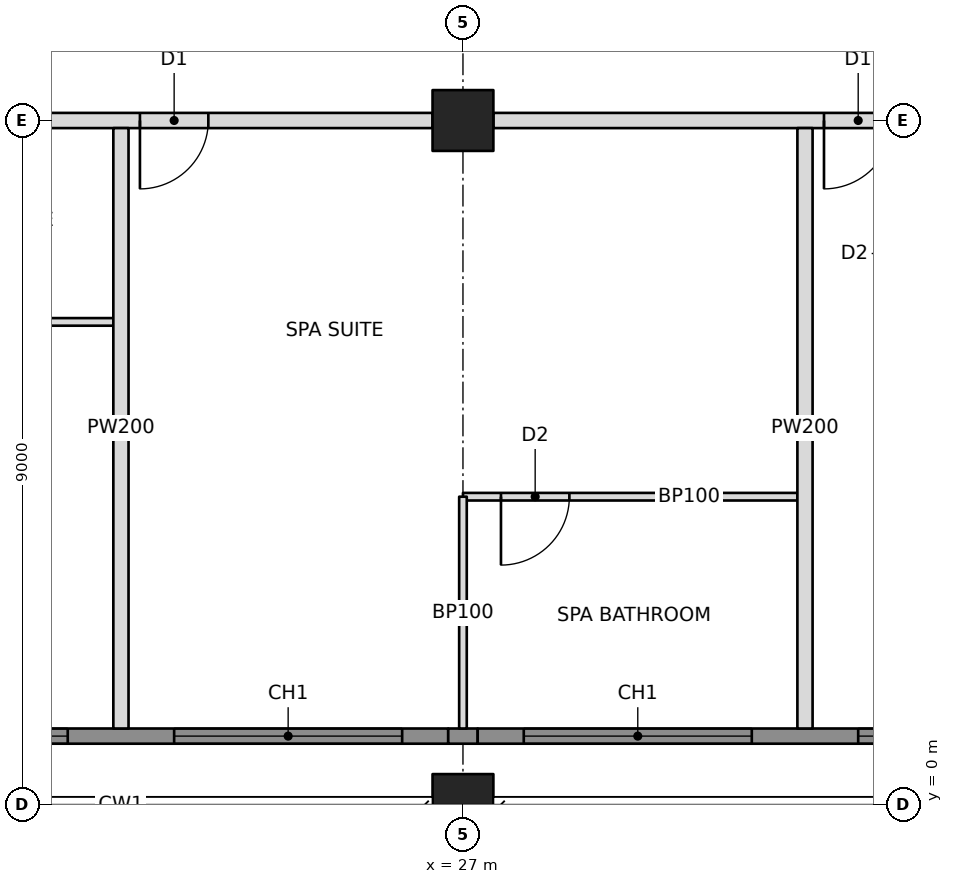
"""IFC4 building model, lengths in metres.
Left out: names, types, materials, properties, quantities, classifications, styles, units other than length and angle.
Written with IfcOpenShell. Run it as: python <this file> out.ifc"""

import sys

from ifc_helpers import new_model, si_unit, direction, frame, frame_2d, origin, origin_2d, place, context, subcontext, project, spatial, rectangle, hollow_rectangle, extrude, element, fill, save


model = new_model("IFC4")
c1 = context("Model", 3, precision=1e-05, world=origin(), true_north=direction((0.0, 1.0)))
c2 = subcontext(c1, "Body", "Model", "MODEL_VIEW")
j1 = project(units=[si_unit("LENGTHUNIT", "METRE"), si_unit("PLANEANGLEUNIT", "RADIAN")], contexts=[c1])
p1 = place(None, origin())
s1 = spatial("IfcSite", under=j1, at=p1, CompositionType="ELEMENT")
p2 = place(p1, origin())
s2 = spatial("IfcBuilding", under=s1, at=p2, CompositionType="ELEMENT")
p3 = place(p2, frame((0.0, 0.0, 208.0)))
s3 = spatial("IfcBuildingStorey", under=s2, at=p3, CompositionType="ELEMENT", Elevation=208.0)
p4 = place(p3, frame((27.0, 0.0, 0.0), z_axis=(0.0, 0.0, 1.0), x_axis=(1.0, 0.0, 0.0)))
e1 = element("IfcColumn", 1, at=p4, inside=s3, PredefinedType="COLUMN", context=c2, shape_type="SweptSolid", body=[
    extrude(hollow_rectangle(XDim=0.8, YDim=0.8, WallThickness=0.06, at=origin_2d()), origin(), (0.0, 0.0, 1.0), 3.4),
])
p5 = place(p3, frame((27.0, 9.0, 0.0), z_axis=(0.0, 0.0, 1.0), x_axis=(1.0, 0.0, 0.0)))
e2 = element("IfcColumn", 2, at=p5, inside=s3, PredefinedType="COLUMN", context=c2, shape_type="SweptSolid", body=[
    extrude(hollow_rectangle(XDim=0.8, YDim=0.8, WallThickness=0.05, at=origin_2d()), origin(), (0.0, 0.0, 1.0), 3.4),
])
p6 = place(p3, frame((18.4, 9.0, 0.0), z_axis=(0.0, 0.0, 1.0), x_axis=(1.0, 0.0, 0.0)))
e3 = element("IfcWall", 3, at=p6, inside=s3, PredefinedType="PARTITIONING", context=c2, shape_type="SweptSolid", body=[
    extrude(rectangle(XDim=8.2, YDim=0.2, at=frame_2d((4.1, 0.0))), origin(), (0.0, 0.0, 1.0), 2.405),
])
p7 = place(p6, frame((4.35, 0.0, 0.0)))
e4 = element("IfcOpeningElement", 4, at=p7, cuts=e3, PredefinedType="OPENING", context=c2, shape_type="SweptSolid", body=[
    extrude(rectangle(XDim=0.9, YDim=2.1, at=frame_2d((0.45, 1.05))), frame((0.0, 0.11, 0.0), z_axis=(0.0, -1.0, 0.0), x_axis=(1.0, 0.0, 0.0)), (0.0, 0.0, 1.0), 0.22),
])
p8 = place(p3, frame((27.4, 9.0, 0.0), z_axis=(0.0, 0.0, 1.0), x_axis=(1.0, 0.0, 0.0)))
e5 = element("IfcWall", 5, at=p8, inside=s3, PredefinedType="PARTITIONING", context=c2, shape_type="SweptSolid", body=[
    extrude(rectangle(XDim=8.2, YDim=0.2, at=frame_2d((4.1, 0.0))), origin(), (0.0, 0.0, 1.0), 2.405),
])
p9 = place(p8, frame((4.35, 0.0, 0.0)))
e6 = element("IfcOpeningElement", 6, at=p9, cuts=e5, PredefinedType="OPENING", context=c2, shape_type="SweptSolid", body=[
    extrude(rectangle(XDim=0.9, YDim=2.1, at=frame_2d((0.45, 1.05))), frame((0.0, 0.11, 0.0), z_axis=(0.0, -1.0, 0.0), x_axis=(1.0, 0.0, 0.0)), (0.0, 0.0, 1.0), 0.22),
])
for number, where, z_axis, x_axis in (
    (7, (22.5, 8.9, 0.0), (0.0, 0.0, 1.0), (0.0, -1.0, 0.0)),
    (8, (31.5, 8.9, 0.0), (0.0, 0.0, 1.0), (0.0, -1.0, 0.0)),
):
    element("IfcWall", number, at=place(p3, frame(where, z_axis=z_axis, x_axis=x_axis)), inside=s3, PredefinedType="PARTITIONING", context=c2, shape_type="SweptSolid", body=[
        extrude(rectangle(XDim=7.9, YDim=0.2, at=frame_2d((3.95, 0.0))), origin(), (0.0, 0.0, 1.0), 2.404),
    ])
p10 = place(p3, frame((18.95, 6.35, 0.0), z_axis=(0.0, 0.0, 1.0), x_axis=(1.0, 0.0, 0.0)))
e9 = element("IfcWall", 9, at=p10, inside=s3, PredefinedType="PARTITIONING", context=c2, shape_type="SweptSolid", body=[
    extrude(rectangle(XDim=3.45, YDim=0.1, at=frame_2d((1.725, 0.0))), origin(), (0.0, 0.0, 1.0), 3.2),
])
p11 = place(p3, frame((27.0, 4.05, 0.0), z_axis=(0.0, 0.0, 1.0), x_axis=(1.0, 0.0, 0.0)))
e10 = element("IfcWall", 10, at=p11, inside=s3, PredefinedType="PARTITIONING", context=c2, shape_type="SweptSolid", body=[
    extrude(rectangle(XDim=4.4, YDim=0.1, at=frame_2d((2.2, 0.0))), origin(), (0.0, 0.0, 1.0), 2.404),
])
p12 = place(p11, frame((0.5, 0.0, 0.0)))
e11 = element("IfcOpeningElement", 11, at=p12, cuts=e10, PredefinedType="OPENING", context=c2, shape_type="SweptSolid", body=[
    extrude(rectangle(XDim=0.9, YDim=2.1, at=frame_2d((0.45, 1.05))), frame((0.0, 0.06, 0.0), z_axis=(0.0, -1.0, 0.0), x_axis=(1.0, 0.0, 0.0)), (0.0, 0.0, 1.0), 0.12),
])
p13 = place(p3, frame((27.0, 4.05, 0.0), z_axis=(0.0, 0.0, 1.0), x_axis=(0.0, -1.0, 0.0)))
e12 = element("IfcWall", 12, at=p13, inside=s3, PredefinedType="PARTITIONING", context=c2, shape_type="SweptSolid", body=[
    extrude(rectangle(XDim=3.05, YDim=0.1, at=frame_2d((1.525, 0.0))), origin(), (0.0, 0.0, 1.0), 2.405),
])
p14 = place(p3, frame((18.194, 0.9, 0.0), z_axis=(0.0, 0.0, 1.0), x_axis=(1.0, 0.0, 0.0)))
e13 = element("IfcWall", 13, at=p14, inside=s3, PredefinedType="SOLIDWALL", context=c2, shape_type="SweptSolid", body=[
    extrude(rectangle(XDim=8.612, YDim=0.2, at=frame_2d((4.306, 0.0))), origin(), (0.0, 0.0, 1.0), 3.2),
])
p15 = place(p14, frame((0.606, 0.0, 0.6)))
e14 = element("IfcOpeningElement", 14, at=p15, cuts=e13, PredefinedType="OPENING", context=c2, shape_type="SweptSolid", body=[
    extrude(rectangle(XDim=3.0, YDim=2.2, at=frame_2d((1.5, 1.1))), frame((0.0, 0.11, 0.0), z_axis=(0.0, -1.0, 0.0), x_axis=(1.0, 0.0, 0.0)), (0.0, 0.0, 1.0), 0.22),
])
p16 = place(p14, frame((5.006, 0.0, 0.6)))
e15 = element("IfcOpeningElement", 15, at=p16, cuts=e13, PredefinedType="OPENING", context=c2, shape_type="SweptSolid", body=[
    extrude(rectangle(XDim=3.0, YDim=2.2, at=frame_2d((1.5, 1.1))), frame((0.0, 0.11, 0.0), z_axis=(0.0, -1.0, 0.0), x_axis=(1.0, 0.0, 0.0)), (0.0, 0.0, 1.0), 0.22),
])
p17 = place(p3, frame((26.806, 0.9, 0.0), z_axis=(0.0, 0.0, 1.0), x_axis=(1.0, 0.0, 0.0)))
e16 = element("IfcWall", 16, at=p17, inside=s3, PredefinedType="SOLIDWALL", context=c2, shape_type="SweptSolid", body=[
    extrude(rectangle(XDim=0.388, YDim=0.2, at=frame_2d((0.194, 0.0))), origin(), (0.0, 0.0, 1.0), 2.404),
])
p18 = place(p3, frame((27.194, 0.9, 0.0), z_axis=(0.0, 0.0, 1.0), x_axis=(1.0, 0.0, 0.0)))
e17 = element("IfcWall", 17, at=p18, inside=s3, PredefinedType="SOLIDWALL", context=c2, shape_type="SweptSolid", body=[
    extrude(rectangle(XDim=8.671, YDim=0.2, at=frame_2d((4.335, 0.0))), origin(), (0.0, 0.0, 1.0), 3.2),
])
p19 = place(p18, frame((0.606, 0.0, 0.6)))
e18 = element("IfcOpeningElement", 18, at=p19, cuts=e17, PredefinedType="OPENING", context=c2, shape_type="SweptSolid", body=[
    extrude(rectangle(XDim=3.0, YDim=2.2, at=frame_2d((1.5, 1.1))), frame((0.0, 0.11, 0.0), z_axis=(0.0, -1.0, 0.0), x_axis=(1.0, 0.0, 0.0)), (0.0, 0.0, 1.0), 0.22),
])
p20 = place(p18, frame((5.006, 0.0, 0.6)))
e19 = element("IfcOpeningElement", 19, at=p20, cuts=e17, PredefinedType="OPENING", context=c2, shape_type="SweptSolid", body=[
    extrude(rectangle(XDim=3.0, YDim=2.2, at=frame_2d((1.5, 1.1))), frame((0.0, 0.11, 0.0), z_axis=(0.0, -1.0, 0.0), x_axis=(1.0, 0.0, 0.0)), (0.0, 0.0, 1.0), 0.22),
])
p21 = place(p15, origin())
e20 = element("IfcWindow", 20, at=p21, inside=s3, PartitioningType="TRIPLE_PANEL_VERTICAL", PredefinedType="WINDOW", context=c2, shape_type="SweptSolid", body=[
    extrude(rectangle(XDim=3.0, YDim=2.2, at=frame_2d((1.5, 1.1))), frame((0.0, 0.03, 0.0), z_axis=(0.0, -1.0, 0.0), x_axis=(1.0, 0.0, 0.0)), (0.0, 0.0, 1.0), 0.06),
])
fill(e14, e20)
p22 = place(p16, origin())
e21 = element("IfcWindow", 21, at=p22, inside=s3, PartitioningType="TRIPLE_PANEL_VERTICAL", PredefinedType="WINDOW", context=c2, shape_type="SweptSolid", body=[
    extrude(rectangle(XDim=3.0, YDim=2.2, at=frame_2d((1.5, 1.1))), frame((0.0, 0.03, 0.0), z_axis=(0.0, -1.0, 0.0), x_axis=(1.0, 0.0, 0.0)), (0.0, 0.0, 1.0), 0.06),
])
fill(e15, e21)
p23 = place(p19, origin())
e22 = element("IfcWindow", 22, at=p23, inside=s3, PartitioningType="TRIPLE_PANEL_VERTICAL", PredefinedType="WINDOW", context=c2, shape_type="SweptSolid", body=[
    extrude(rectangle(XDim=3.0, YDim=2.2, at=frame_2d((1.5, 1.1))), frame((0.0, 0.03, 0.0), z_axis=(0.0, -1.0, 0.0), x_axis=(1.0, 0.0, 0.0)), (0.0, 0.0, 1.0), 0.06),
])
fill(e18, e22)
p24 = place(p20, origin())
e23 = element("IfcWindow", 23, at=p24, inside=s3, PartitioningType="TRIPLE_PANEL_VERTICAL", PredefinedType="WINDOW", context=c2, shape_type="SweptSolid", body=[
    extrude(rectangle(XDim=3.0, YDim=2.2, at=frame_2d((1.5, 1.1))), frame((0.0, 0.03, 0.0), z_axis=(0.0, -1.0, 0.0), x_axis=(1.0, 0.0, 0.0)), (0.0, 0.0, 1.0), 0.06),
])
fill(e19, e23)
p25 = place(p12, frame((0.9, 0.0, 0.0), z_axis=(0.0, 0.0, 1.0), x_axis=(-1.0, 0.0, 0.0)))
e24 = element("IfcDoor", 24, at=p25, inside=s3, OperationType="SINGLE_SWING_RIGHT", PredefinedType="DOOR", context=c2, shape_type="SweptSolid", body=[
    extrude(rectangle(XDim=0.9, YDim=2.1, at=frame_2d((0.45, 1.05))), frame((0.0, 0.025, 0.0), z_axis=(0.0, -1.0, 0.0), x_axis=(1.0, 0.0, 0.0)), (0.0, 0.0, 1.0), 0.05),
])
fill(e11, e24)
p26 = place(p7, frame((0.9, 0.0, 0.0), z_axis=(0.0, 0.0, 1.0), x_axis=(-1.0, 0.0, 0.0)))
e25 = element("IfcDoor", 25, at=p26, inside=s3, OperationType="SINGLE_SWING_RIGHT", PredefinedType="DOOR", context=c2, shape_type="SweptSolid", body=[
    extrude(rectangle(XDim=0.9, YDim=2.1, at=frame_2d((0.45, 1.05))), frame((0.0, 0.025, 0.0), z_axis=(0.0, -1.0, 0.0), x_axis=(1.0, 0.0, 0.0)), (0.0, 0.0, 1.0), 0.05),
])
fill(e4, e25)
p27 = place(p9, frame((0.9, 0.0, 0.0), z_axis=(0.0, 0.0, 1.0), x_axis=(-1.0, 0.0, 0.0)))
e26 = element("IfcDoor", 26, at=p27, inside=s3, OperationType="SINGLE_SWING_RIGHT", PredefinedType="DOOR", context=c2, shape_type="SweptSolid", body=[
    extrude(rectangle(XDim=0.9, YDim=2.1, at=frame_2d((0.45, 1.05))), frame((0.0, 0.025, 0.0), z_axis=(0.0, -1.0, 0.0), x_axis=(1.0, 0.0, 0.0)), (0.0, 0.0, 1.0), 0.05),
])
fill(e6, e26)
save(model, sys.argv[1])
